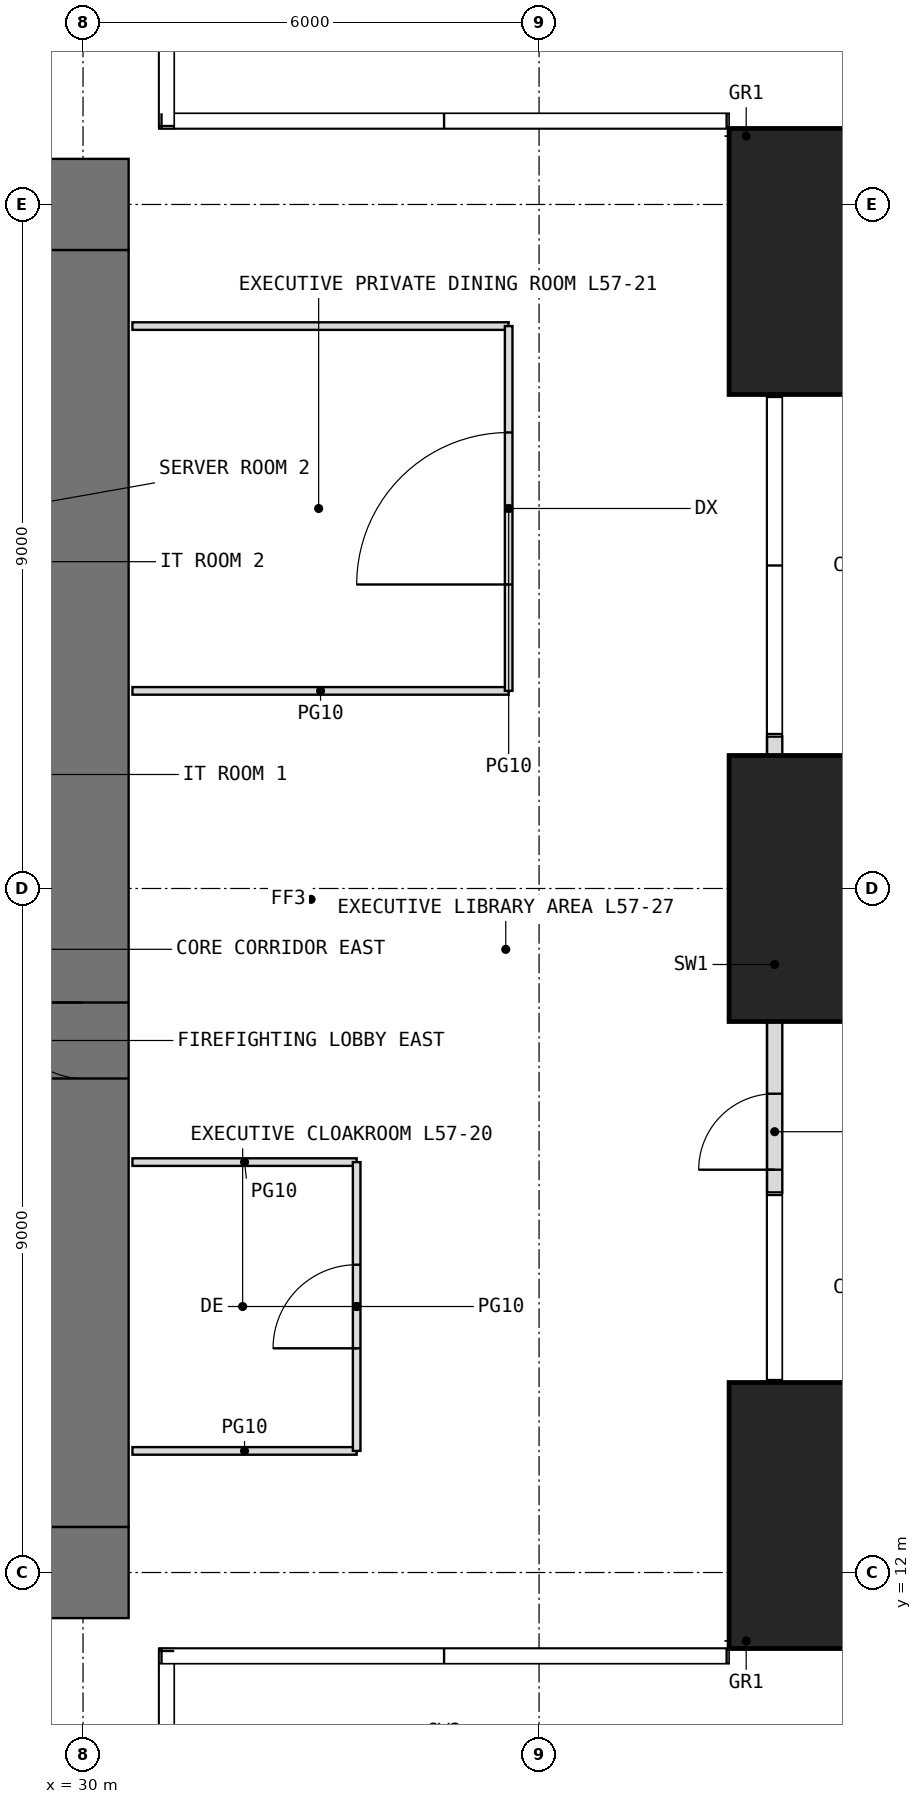
"""IFC4 building model, lengths in metres.
Left out: names, types, materials, properties, quantities, classifications, styles, units other than length and angle.
Written with IfcOpenShell. Run it as: python <this file> out.ifc"""

import sys

from ifc_helpers import new_model, si_unit, direction, frame, frame_2d, origin, origin_2d, place, context, subcontext, project, spatial, rectangle, extrude, element, fill, save


model = new_model("IFC4")
c1 = context("Model", 3, precision=1e-05, world=origin(), true_north=direction((0.0, 1.0)))
c2 = subcontext(c1, "Body", "Model", "MODEL_VIEW")
j1 = project(units=[si_unit("LENGTHUNIT", "METRE"), si_unit("PLANEANGLEUNIT", "RADIAN")], contexts=[c1])
p1 = place(None, origin())
s1 = spatial("IfcSite", under=j1, at=p1, CompositionType="ELEMENT")
p2 = place(p1, origin())
s2 = spatial("IfcBuilding", under=s1, at=p2, CompositionType="ELEMENT")
p3 = place(p2, frame((0.0, 0.0, 239.5)))
s3 = spatial("IfcBuildingStorey", under=s2, at=p3, CompositionType="ELEMENT", Elevation=239.5)
for number, where, z_axis, x_axis in (
    (1, (40.25, 12.75, 0.0), (0.0, 0.0, 1.0), (1.0, 0.0, 0.0)),
    (2, (40.25, 21.0, 0.0), (0.0, 0.0, 1.0), (1.0, 0.0, 0.0)),
    (3, (40.25, 29.25, 0.0), (0.0, 0.0, 1.0), (1.0, 0.0, 0.0)),
):
    element("IfcColumn", number, at=place(p3, frame(where, z_axis=z_axis, x_axis=x_axis)), inside=s3, PredefinedType="COLUMN", context=c2, shape_type="SweptSolid", body=[
        extrude(rectangle(XDim=3.5, YDim=3.5, at=origin_2d()), origin(), (0.0, 0.0, 1.0), 4.5),
    ])
p4 = place(p3, frame((39.1, 17.0, 0.0), z_axis=(0.0, 0.0, 1.0), x_axis=(0.0, 1.0, 0.0)))
e4 = element("IfcWall", 4, at=p4, inside=s3, PredefinedType="USERDEFINED", context=c2, shape_type="SweptSolid", body=[
    extrude(rectangle(XDim=6.0, YDim=0.2, at=frame_2d((3.0, 0.0))), origin(), (0.0, 0.0, 1.0), 4.25),
])
p5 = place(p4, frame((0.3, 0.0, 0.0)))
e5 = element("IfcOpeningElement", 5, at=p5, cuts=e4, PredefinedType="OPENING", context=c2, shape_type="SweptSolid", body=[
    extrude(rectangle(XDim=1.0, YDim=2.4, at=frame_2d((0.5, 1.2))), frame((0.0, 0.11, 0.0), z_axis=(0.0, -1.0, 0.0), x_axis=(1.0, 0.0, 0.0)), (0.0, 0.0, 1.0), 0.22),
])
p6 = place(p3, frame((11.4, 12.0, -0.05), z_axis=(0.0, 0.0, 1.0), x_axis=(1.0, 0.0, 0.0)))
e6 = element("IfcWall", 6, at=p6, inside=s3, PredefinedType="SHEAR", context=c2, shape_type="SweptSolid", body=[
    extrude(rectangle(XDim=19.2, YDim=1.2, at=frame_2d((9.6, 0.0))), origin(), (0.0, 0.0, 1.0), 4.5),
])
p7 = place(p6, frame((8.6, 0.0, 0.05)))
e7 = element("IfcOpeningElement", 7, at=p7, cuts=e6, PredefinedType="OPENING", context=c2, shape_type="SweptSolid", body=[
    extrude(rectangle(XDim=2.0, YDim=2.2, at=frame_2d((1.0, 1.1))), frame((0.0, 0.61, 0.0), z_axis=(0.0, -1.0, 0.0), x_axis=(1.0, 0.0, 0.0)), (0.0, 0.0, 1.0), 1.22),
])
p8 = place(p3, frame((11.4, 30.0, -0.05), z_axis=(0.0, 0.0, 1.0), x_axis=(1.0, 0.0, 0.0)))
e8 = element("IfcWall", 8, at=p8, inside=s3, PredefinedType="SHEAR", context=c2, shape_type="SweptSolid", body=[
    extrude(rectangle(XDim=19.2, YDim=1.2, at=frame_2d((9.6, 0.0))), origin(), (0.0, 0.0, 1.0), 4.5),
])
p9 = place(p8, frame((8.6, 0.0, 0.05)))
e9 = element("IfcOpeningElement", 9, at=p9, cuts=e8, PredefinedType="OPENING", context=c2, shape_type="SweptSolid", body=[
    extrude(rectangle(XDim=2.0, YDim=2.2, at=frame_2d((1.0, 1.1))), frame((0.0, 0.61, 0.0), z_axis=(0.0, -1.0, 0.0), x_axis=(1.0, 0.0, 0.0)), (0.0, 0.0, 1.0), 1.22),
])
p10 = place(p3, frame((30.0, 12.6, -0.05), z_axis=(0.0, 0.0, 1.0), x_axis=(0.0, 1.0, 0.0)))
e10 = element("IfcWall", 10, at=p10, inside=s3, PredefinedType="SHEAR", context=c2, shape_type="SweptSolid", body=[
    extrude(rectangle(XDim=16.8, YDim=1.2, at=frame_2d((8.4, 0.0))), origin(), (0.0, 0.0, 1.0), 4.5),
])
p11 = place(p10, frame((5.9, 0.0, 0.05)))
e11 = element("IfcOpeningElement", 11, at=p11, cuts=e10, PredefinedType="OPENING", context=c2, shape_type="SweptSolid", body=[
    extrude(rectangle(XDim=1.0, YDim=2.2, at=frame_2d((0.5, 1.1))), frame((0.0, 0.61, 0.0), z_axis=(0.0, -1.0, 0.0), x_axis=(1.0, 0.0, 0.0)), (0.0, 0.0, 1.0), 1.22),
])
for number, where, z_axis, x_axis in (
    (12, (30.65, 13.6, 0.0), (0.0, 0.0, 1.0), (1.0, 0.0, 0.0)),
    (13, (30.65, 17.4, 0.0), (0.0, 0.0, 1.0), (1.0, 0.0, 0.0)),
):
    element("IfcWall", number, at=place(p3, frame(where, z_axis=z_axis, x_axis=x_axis)), inside=s3, PredefinedType="PARTITIONING", context=c2, shape_type="SweptSolid", body=[
        extrude(rectangle(XDim=2.95, YDim=0.1, at=frame_2d((1.475, 0.0))), origin(), (0.0, 0.0, 1.0), 4.25),
    ])
for number, where, z_axis, x_axis in (
    (14, (30.65, 23.6, 0.0), (0.0, 0.0, 1.0), (1.0, 0.0, 0.0)),
    (15, (30.65, 28.4, 0.0), (0.0, 0.0, 1.0), (1.0, 0.0, 0.0)),
):
    element("IfcWall", number, at=place(p3, frame(where, z_axis=z_axis, x_axis=x_axis)), inside=s3, PredefinedType="PARTITIONING", context=c2, shape_type="SweptSolid", body=[
        extrude(rectangle(XDim=4.95, YDim=0.1, at=frame_2d((2.475, 0.0))), origin(), (0.0, 0.0, 1.0), 4.25),
    ])
p12 = place(p3, frame((33.6, 13.6, 0.0), z_axis=(0.0, 0.0, 1.0), x_axis=(0.0, 1.0, 0.0)))
e16 = element("IfcWall", 16, at=p12, inside=s3, PredefinedType="PARTITIONING", context=c2, shape_type="SweptSolid", body=[
    extrude(rectangle(XDim=3.8, YDim=0.1, at=frame_2d((1.9, 0.0))), origin(), (0.0, 0.0, 1.0), 4.25),
])
p13 = place(p12, frame((1.35, 0.0, 0.0)))
e17 = element("IfcOpeningElement", 17, at=p13, cuts=e16, PredefinedType="OPENING", context=c2, shape_type="SweptSolid", body=[
    extrude(rectangle(XDim=1.1, YDim=2.3, at=frame_2d((0.55, 1.15))), frame((0.0, 0.06, 0.0), z_axis=(0.0, -1.0, 0.0), x_axis=(1.0, 0.0, 0.0)), (0.0, 0.0, 1.0), 0.12),
])
p14 = place(p3, frame((35.6, 23.6, 0.0), z_axis=(0.0, 0.0, 1.0), x_axis=(0.0, 1.0, 0.0)))
e18 = element("IfcWall", 18, at=p14, inside=s3, PredefinedType="PARTITIONING", context=c2, shape_type="SweptSolid", body=[
    extrude(rectangle(XDim=4.8, YDim=0.1, at=frame_2d((2.4, 0.0))), origin(), (0.0, 0.0, 1.0), 4.25),
])
p15 = place(p14, frame((1.4, 0.0, 0.0)))
e19 = element("IfcOpeningElement", 19, at=p15, cuts=e18, PredefinedType="OPENING", context=c2, shape_type="SweptSolid", body=[
    extrude(rectangle(XDim=2.0, YDim=2.4, at=frame_2d((1.0, 1.2))), frame((0.0, 0.06, 0.0), z_axis=(0.0, -1.0, 0.0), x_axis=(1.0, 0.0, 0.0)), (0.0, 0.0, 1.0), 0.12),
])
p16 = place(p5, origin())
e20 = element("IfcDoor", 20, at=p16, inside=s3, OperationType="SINGLE_SWING_LEFT", PredefinedType="DOOR", context=c2, shape_type="SweptSolid", body=[
    extrude(rectangle(XDim=1.0, YDim=2.4, at=frame_2d((0.5, 1.2))), frame((0.0, 0.025, 0.0), z_axis=(0.0, -1.0, 0.0), x_axis=(1.0, 0.0, 0.0)), (0.0, 0.0, 1.0), 0.05),
])
fill(e5, e20)
p17 = place(p11, origin())
e21 = element("IfcDoor", 21, at=p17, inside=s3, OperationType="SINGLE_SWING_RIGHT", PredefinedType="DOOR", context=c2, shape_type="SweptSolid", body=[
    extrude(rectangle(XDim=1.0, YDim=2.2, at=frame_2d((0.5, 1.1))), frame((0.0, 0.025, 0.0), z_axis=(0.0, -1.0, 0.0), x_axis=(1.0, 0.0, 0.0)), (0.0, 0.0, 1.0), 0.05),
])
fill(e11, e21)
p18 = place(p13, origin())
e22 = element("IfcDoor", 22, at=p18, inside=s3, OperationType="SINGLE_SWING_LEFT", PredefinedType="DOOR", context=c2, shape_type="SweptSolid", body=[
    extrude(rectangle(XDim=1.1, YDim=2.3, at=frame_2d((0.55, 1.15))), frame((0.0, 0.025, 0.0), z_axis=(0.0, -1.0, 0.0), x_axis=(1.0, 0.0, 0.0)), (0.0, 0.0, 1.0), 0.05),
])
fill(e17, e22)
p19 = place(p15, origin())
e23 = element("IfcDoor", 23, at=p19, inside=s3, OperationType="DOUBLE_DOOR_SINGLE_SWING", PredefinedType="DOOR", context=c2, shape_type="SweptSolid", body=[
    extrude(rectangle(XDim=2.0, YDim=2.4, at=frame_2d((1.0, 1.2))), frame((0.0, 0.025, 0.0), z_axis=(0.0, -1.0, 0.0), x_axis=(1.0, 0.0, 0.0)), (0.0, 0.0, 1.0), 0.05),
])
fill(e19, e23)
save(model, sys.argv[1])
